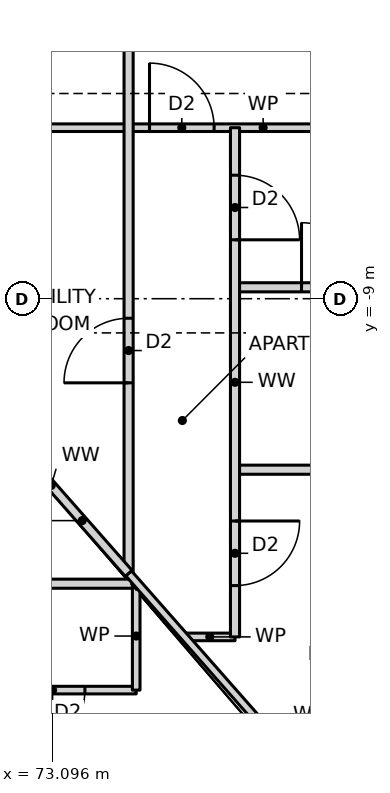
"""IFC4 building model, lengths in metres.
Left out: names, types, materials, properties, quantities, classifications, styles, units other than length and angle.
Written with IfcOpenShell. Run it as: python <this file> out.ifc"""

import sys

from ifc_helpers import new_model, si_unit, direction, frame, frame_2d, origin, place, context, subcontext, project, spatial, rectangle, extrude, element, fill, save


model = new_model("IFC4")
c1 = context("Model", 3, precision=1e-05, world=origin(), true_north=direction((0.0, 1.0)))
c2 = subcontext(c1, "Body", "Model", "MODEL_VIEW")
j1 = project(units=[si_unit("LENGTHUNIT", "METRE"), si_unit("PLANEANGLEUNIT", "RADIAN")], contexts=[c1])
p1 = place(None, origin())
s1 = spatial("IfcSite", under=j1, at=p1, CompositionType="ELEMENT")
p2 = place(p1, origin())
s2 = spatial("IfcBuilding", under=s1, at=p2, CompositionType="ELEMENT")
p3 = place(p2, frame((0.0, 0.0, 39.5)))
s3 = spatial("IfcBuildingStorey", under=s2, at=p3, CompositionType="ELEMENT", Elevation=39.5)
p4 = place(p3, frame((63.0, -14.15, 0.0), z_axis=(0.0, 0.0, 1.0), x_axis=(1.0, 0.0, 0.0)))
e1 = element("IfcWall", 1, at=p4, inside=s3, PredefinedType="PARTITIONING", context=c2, shape_type="SweptSolid", body=[
    extrude(rectangle(XDim=11.2, YDim=0.1, at=frame_2d((5.6, 0.0))), origin(), (0.0, 0.0, 1.0), 3.27),
])
p5 = place(p4, frame((1.825, 0.0, 0.0)))
e2 = element("IfcOpeningElement", 2, at=p5, cuts=e1, PredefinedType="OPENING", context=c2, shape_type="SweptSolid", body=[
    extrude(rectangle(XDim=0.85, YDim=2.1, at=frame_2d((0.425, 1.05))), frame((0.0, 0.06, 0.0), z_axis=(0.0, -1.0, 0.0), x_axis=(1.0, 0.0, 0.0)), (0.0, 0.0, 1.0), 0.12),
])
p6 = place(p4, frame((6.325, 0.0, 0.0)))
e3 = element("IfcOpeningElement", 3, at=p6, cuts=e1, PredefinedType="OPENING", context=c2, shape_type="SweptSolid", body=[
    extrude(rectangle(XDim=0.85, YDim=2.1, at=frame_2d((0.425, 1.05))), frame((0.0, 0.06, 0.0), z_axis=(0.0, -1.0, 0.0), x_axis=(1.0, 0.0, 0.0)), (0.0, 0.0, 1.0), 0.12),
])
p7 = place(p4, frame((9.675, 0.0, 0.0)))
e4 = element("IfcOpeningElement", 4, at=p7, cuts=e1, PredefinedType="OPENING", context=c2, shape_type="SweptSolid", body=[
    extrude(rectangle(XDim=0.85, YDim=2.1, at=frame_2d((0.425, 1.05))), frame((0.0, 0.06, 0.0), z_axis=(0.0, -1.0, 0.0), x_axis=(1.0, 0.0, 0.0)), (0.0, 0.0, 1.0), 0.12),
])
p8 = place(p3, frame((74.836, -13.45, 0.0), z_axis=(0.0, 0.0, 1.0), x_axis=(1.0, 0.0, 0.0)))
e5 = element("IfcWall", 5, at=p8, inside=s3, PredefinedType="PARTITIONING", context=c2, shape_type="SweptSolid", body=[
    extrude(rectangle(XDim=0.664, YDim=0.1, at=frame_2d((0.332, 0.0))), origin(), (0.0, 0.0, 1.0), 3.27),
])
p9 = place(p3, frame((54.0, -12.75, 0.0), z_axis=(0.0, 0.0, 1.0), x_axis=(1.0, 0.0, 0.0)))
e6 = element("IfcWall", 6, at=p9, inside=s3, PredefinedType="PARTITIONING", context=c2, shape_type="SweptSolid", body=[
    extrude(rectangle(XDim=20.2, YDim=0.12, at=frame_2d((10.1, 0.0))), origin(), (0.0, 0.0, 1.0), 3.27),
])
p10 = place(p9, frame((1.375, 0.0, 0.0)))
e7 = element("IfcOpeningElement", 7, at=p10, cuts=e6, PredefinedType="OPENING", context=c2, shape_type="SweptSolid", body=[
    extrude(rectangle(XDim=0.85, YDim=2.1, at=frame_2d((0.425, 1.05))), frame((0.0, 0.07, 0.0), z_axis=(0.0, -1.0, 0.0), x_axis=(1.0, 0.0, 0.0)), (0.0, 0.0, 1.0), 0.14),
])
p11 = place(p9, frame((4.575, 0.0, 0.0)))
e8 = element("IfcOpeningElement", 8, at=p11, cuts=e6, PredefinedType="OPENING", context=c2, shape_type="SweptSolid", body=[
    extrude(rectangle(XDim=0.85, YDim=2.1, at=frame_2d((0.425, 1.05))), frame((0.0, 0.07, 0.0), z_axis=(0.0, -1.0, 0.0), x_axis=(1.0, 0.0, 0.0)), (0.0, 0.0, 1.0), 0.14),
])
p12 = place(p9, frame((10.225, 0.0, 0.0)))
e9 = element("IfcOpeningElement", 9, at=p12, cuts=e6, PredefinedType="OPENING", context=c2, shape_type="SweptSolid", body=[
    extrude(rectangle(XDim=0.85, YDim=2.1, at=frame_2d((0.425, 1.05))), frame((0.0, 0.07, 0.0), z_axis=(0.0, -1.0, 0.0), x_axis=(1.0, 0.0, 0.0)), (0.0, 0.0, 1.0), 0.14),
])
p13 = place(p9, frame((15.825, 0.0, 0.0)))
e10 = element("IfcOpeningElement", 10, at=p13, cuts=e6, PredefinedType="OPENING", context=c2, shape_type="SweptSolid", body=[
    extrude(rectangle(XDim=0.85, YDim=2.1, at=frame_2d((0.425, 1.05))), frame((0.0, 0.07, 0.0), z_axis=(0.0, -1.0, 0.0), x_axis=(1.0, 0.0, 0.0)), (0.0, 0.0, 1.0), 0.14),
])
p14 = place(p3, frame((75.5, -11.25, 0.0), z_axis=(0.0, 0.0, 1.0), x_axis=(1.0, 0.0, 0.0)))
e11 = element("IfcWall", 11, at=p14, inside=s3, PredefinedType="PARTITIONING", context=c2, shape_type="SweptSolid", body=[
    extrude(rectangle(XDim=3.94, YDim=0.12, at=frame_2d((1.97, 0.0))), origin(), (0.0, 0.0, 1.0), 3.27),
])
p15 = place(p3, frame((75.5, -8.85, 0.0), z_axis=(0.0, 0.0, 1.0), x_axis=(1.0, 0.0, 0.0)))
e12 = element("IfcWall", 12, at=p15, inside=s3, PredefinedType="PARTITIONING", context=c2, shape_type="SweptSolid", body=[
    extrude(rectangle(XDim=2.6, YDim=0.12, at=frame_2d((1.3, 0.0))), origin(), (0.0, 0.0, 1.0), 3.27),
])
p16 = place(p15, frame((0.875, 0.0, 0.0)))
e13 = element("IfcOpeningElement", 13, at=p16, cuts=e12, PredefinedType="OPENING", context=c2, shape_type="SweptSolid", body=[
    extrude(rectangle(XDim=0.85, YDim=2.1, at=frame_2d((0.425, 1.05))), frame((0.0, 0.07, 0.0), z_axis=(0.0, -1.0, 0.0), x_axis=(1.0, 0.0, 0.0)), (0.0, 0.0, 1.0), 0.14),
])
p17 = place(p3, frame((72.3, -6.75, 0.0), z_axis=(0.0, 0.0, 1.0), x_axis=(1.0, 0.0, 0.0)))
e14 = element("IfcWall", 14, at=p17, inside=s3, PredefinedType="PARTITIONING", context=c2, shape_type="SweptSolid", body=[
    extrude(rectangle(XDim=7.14, YDim=0.1, at=frame_2d((3.57, 0.0))), origin(), (0.0, 0.0, 1.0), 3.27),
])
p18 = place(p17, frame((2.075, 0.0, 0.0)))
e15 = element("IfcOpeningElement", 15, at=p18, cuts=e14, PredefinedType="OPENING", context=c2, shape_type="SweptSolid", body=[
    extrude(rectangle(XDim=0.85, YDim=2.1, at=frame_2d((0.425, 1.05))), frame((0.0, 0.06, 0.0), z_axis=(0.0, -1.0, 0.0), x_axis=(1.0, 0.0, 0.0)), (0.0, 0.0, 1.0), 0.12),
])
p19 = place(p3, frame((75.5, -13.45, 0.0), z_axis=(0.0, 0.0, 1.0), x_axis=(0.0, 1.0, 0.0)))
e16 = element("IfcWall", 16, at=p19, inside=s3, PredefinedType="PARTITIONING", context=c2, shape_type="SweptSolid", body=[
    extrude(rectangle(XDim=6.7, YDim=0.12, at=frame_2d((3.35, 0.0))), origin(), (0.0, 0.0, 1.0), 3.27),
])
p20 = place(p19, frame((5.225, 0.0, 0.0)))
e17 = element("IfcOpeningElement", 17, at=p20, cuts=e16, PredefinedType="OPENING", context=c2, shape_type="SweptSolid", body=[
    extrude(rectangle(XDim=0.85, YDim=2.1, at=frame_2d((0.425, 1.05))), frame((0.0, 0.07, 0.0), z_axis=(0.0, -1.0, 0.0), x_axis=(1.0, 0.0, 0.0)), (0.0, 0.0, 1.0), 0.14),
])
p21 = place(p19, frame((0.675, 0.0, 0.0)))
e18 = element("IfcOpeningElement", 18, at=p21, cuts=e16, PredefinedType="OPENING", context=c2, shape_type="SweptSolid", body=[
    extrude(rectangle(XDim=0.85, YDim=2.1, at=frame_2d((0.425, 1.05))), frame((0.0, 0.07, 0.0), z_axis=(0.0, -1.0, 0.0), x_axis=(1.0, 0.0, 0.0)), (0.0, 0.0, 1.0), 0.14),
])
p22 = place(p3, frame((74.2, -14.15, 0.0), z_axis=(0.0, 0.0, 1.0), x_axis=(0.0, 1.0, 0.0)))
e19 = element("IfcWall", 19, at=p22, inside=s3, PredefinedType="PARTITIONING", context=c2, shape_type="SweptSolid", body=[
    extrude(rectangle(XDim=1.423, YDim=0.1, at=frame_2d((0.711, 0.0))), origin(), (0.0, 0.0, 1.0), 3.27),
])
p23 = place(p3, frame((74.1, -12.614, 0.0), z_axis=(0.0, 0.0, 1.0), x_axis=(0.0, 1.0, 0.0)))
e20 = element("IfcWall", 20, at=p23, inside=s3, PredefinedType="PARTITIONING", context=c2, shape_type="SweptSolid", body=[
    extrude(rectangle(XDim=25.228, YDim=0.12, at=frame_2d((12.614, 0.0))), origin(), (0.0, 0.0, 1.0), 3.27),
])
p24 = place(p23, frame((7.239, 0.0, 0.0)))
e21 = element("IfcOpeningElement", 21, at=p24, cuts=e20, PredefinedType="OPENING", context=c2, shape_type="SweptSolid", body=[
    extrude(rectangle(XDim=0.85, YDim=2.1, at=frame_2d((0.425, 1.05))), frame((0.0, 0.07, 0.0), z_axis=(0.0, -1.0, 0.0), x_axis=(1.0, 0.0, 0.0)), (0.0, 0.0, 1.0), 0.14),
])
p25 = place(p23, frame((10.439, 0.0, 0.0)))
e22 = element("IfcOpeningElement", 22, at=p25, cuts=e20, PredefinedType="OPENING", context=c2, shape_type="SweptSolid", body=[
    extrude(rectangle(XDim=0.85, YDim=2.1, at=frame_2d((0.425, 1.05))), frame((0.0, 0.07, 0.0), z_axis=(0.0, -1.0, 0.0), x_axis=(1.0, 0.0, 0.0)), (0.0, 0.0, 1.0), 0.14),
])
p26 = place(p23, frame((2.507, 0.0, 0.0)))
e23 = element("IfcOpeningElement", 23, at=p26, cuts=e20, PredefinedType="OPENING", context=c2, shape_type="SweptSolid", body=[
    extrude(rectangle(XDim=0.85, YDim=2.1, at=frame_2d((0.425, 1.05))), frame((0.0, 0.07, 0.0), z_axis=(0.0, -1.0, 0.0), x_axis=(1.0, 0.0, 0.0)), (0.0, 0.0, 1.0), 0.14),
])
p27 = place(p23, frame((16.639, 0.0, 0.0)))
e24 = element("IfcOpeningElement", 24, at=p27, cuts=e20, PredefinedType="OPENING", context=c2, shape_type="SweptSolid", body=[
    extrude(rectangle(XDim=0.85, YDim=2.1, at=frame_2d((0.425, 1.05))), frame((0.0, 0.07, 0.0), z_axis=(0.0, -1.0, 0.0), x_axis=(1.0, 0.0, 0.0)), (0.0, 0.0, 1.0), 0.14),
])
p28 = place(p23, frame((21.821, 0.0, 0.0)))
e25 = element("IfcOpeningElement", 25, at=p28, cuts=e20, PredefinedType="OPENING", context=c2, shape_type="SweptSolid", body=[
    extrude(rectangle(XDim=0.85, YDim=2.1, at=frame_2d((0.425, 1.05))), frame((0.0, 0.07, 0.0), z_axis=(0.0, -1.0, 0.0), x_axis=(1.0, 0.0, 0.0)), (0.0, 0.0, 1.0), 0.14),
])
p29 = place(p3, frame((78.057, -17.109, 0.0), z_axis=(0.0, 0.0, 1.0), x_axis=(-0.660775837956, 0.750583301156, 0.0)))
e26 = element("IfcWall", 26, at=p29, inside=s3, PredefinedType="PARTITIONING", context=c2, shape_type="SweptSolid", body=[
    extrude(rectangle(XDim=5.989, YDim=0.1, at=frame_2d((2.994, 0.0))), origin(), (0.0, 0.0, 1.0), 2.429),
])
p30 = place(p3, frame((74.1, -12.614, 0.0), z_axis=(0.0, 0.0, 1.0), x_axis=(-0.660767161141, 0.750590939699, 0.0)))
e27 = element("IfcWall", 27, at=p30, inside=s3, PredefinedType="PARTITIONING", context=c2, shape_type="SweptSolid", body=[
    extrude(rectangle(XDim=3.082, YDim=0.12, at=frame_2d((1.541, 0.0))), origin(), (0.0, 0.0, 1.0), 2.429),
])
p31 = place(p7, frame((0.85, 0.0, 0.0), z_axis=(0.0, 0.0, 1.0), x_axis=(-1.0, 0.0, 0.0)))
e28 = element("IfcDoor", 28, at=p31, inside=s3, OperationType="SINGLE_SWING_RIGHT", PredefinedType="DOOR", context=c2, shape_type="SweptSolid", body=[
    extrude(rectangle(XDim=0.85, YDim=2.1, at=frame_2d((0.425, 1.05))), frame((0.0, 0.025, 0.0), z_axis=(0.0, -1.0, 0.0), x_axis=(1.0, 0.0, 0.0)), (0.0, 0.0, 1.0), 0.05),
])
fill(e4, e28)
p32 = place(p18, origin())
e29 = element("IfcDoor", 29, at=p32, inside=s3, OperationType="SINGLE_SWING_LEFT", PredefinedType="DOOR", context=c2, shape_type="SweptSolid", body=[
    extrude(rectangle(XDim=0.85, YDim=2.1, at=frame_2d((0.425, 1.05))), frame((0.0, 0.025, 0.0), z_axis=(0.0, -1.0, 0.0), x_axis=(1.0, 0.0, 0.0)), (0.0, 0.0, 1.0), 0.05),
])
fill(e15, e29)
p33 = place(p16, origin())
e30 = element("IfcDoor", 30, at=p33, inside=s3, OperationType="SINGLE_SWING_LEFT", PredefinedType="DOOR", context=c2, shape_type="SweptSolid", body=[
    extrude(rectangle(XDim=0.85, YDim=2.1, at=frame_2d((0.425, 1.05))), frame((0.0, 0.025, 0.0), z_axis=(0.0, -1.0, 0.0), x_axis=(1.0, 0.0, 0.0)), (0.0, 0.0, 1.0), 0.05),
])
fill(e13, e30)
p34 = place(p20, frame((0.85, 0.0, 0.0), z_axis=(0.0, 0.0, 1.0), x_axis=(-1.0, 0.0, 0.0)))
e31 = element("IfcDoor", 31, at=p34, inside=s3, OperationType="SINGLE_SWING_RIGHT", PredefinedType="DOOR", context=c2, shape_type="SweptSolid", body=[
    extrude(rectangle(XDim=0.85, YDim=2.1, at=frame_2d((0.425, 1.05))), frame((0.0, 0.025, 0.0), z_axis=(0.0, -1.0, 0.0), x_axis=(1.0, 0.0, 0.0)), (0.0, 0.0, 1.0), 0.05),
])
fill(e17, e31)
p35 = place(p21, frame((0.85, 0.0, 0.0), z_axis=(0.0, 0.0, 1.0), x_axis=(-1.0, 0.0, 0.0)))
e32 = element("IfcDoor", 32, at=p35, inside=s3, OperationType="SINGLE_SWING_LEFT", PredefinedType="DOOR", context=c2, shape_type="SweptSolid", body=[
    extrude(rectangle(XDim=0.85, YDim=2.1, at=frame_2d((0.425, 1.05))), frame((0.0, 0.025, 0.0), z_axis=(0.0, -1.0, 0.0), x_axis=(1.0, 0.0, 0.0)), (0.0, 0.0, 1.0), 0.05),
])
fill(e18, e32)
p36 = place(p26, origin())
e33 = element("IfcDoor", 33, at=p36, inside=s3, OperationType="SINGLE_SWING_LEFT", PredefinedType="DOOR", context=c2, shape_type="SweptSolid", body=[
    extrude(rectangle(XDim=0.85, YDim=2.1, at=frame_2d((0.425, 1.05))), frame((0.0, 0.025, 0.0), z_axis=(0.0, -1.0, 0.0), x_axis=(1.0, 0.0, 0.0)), (0.0, 0.0, 1.0), 0.05),
])
fill(e23, e33)
save(model, sys.argv[1])
